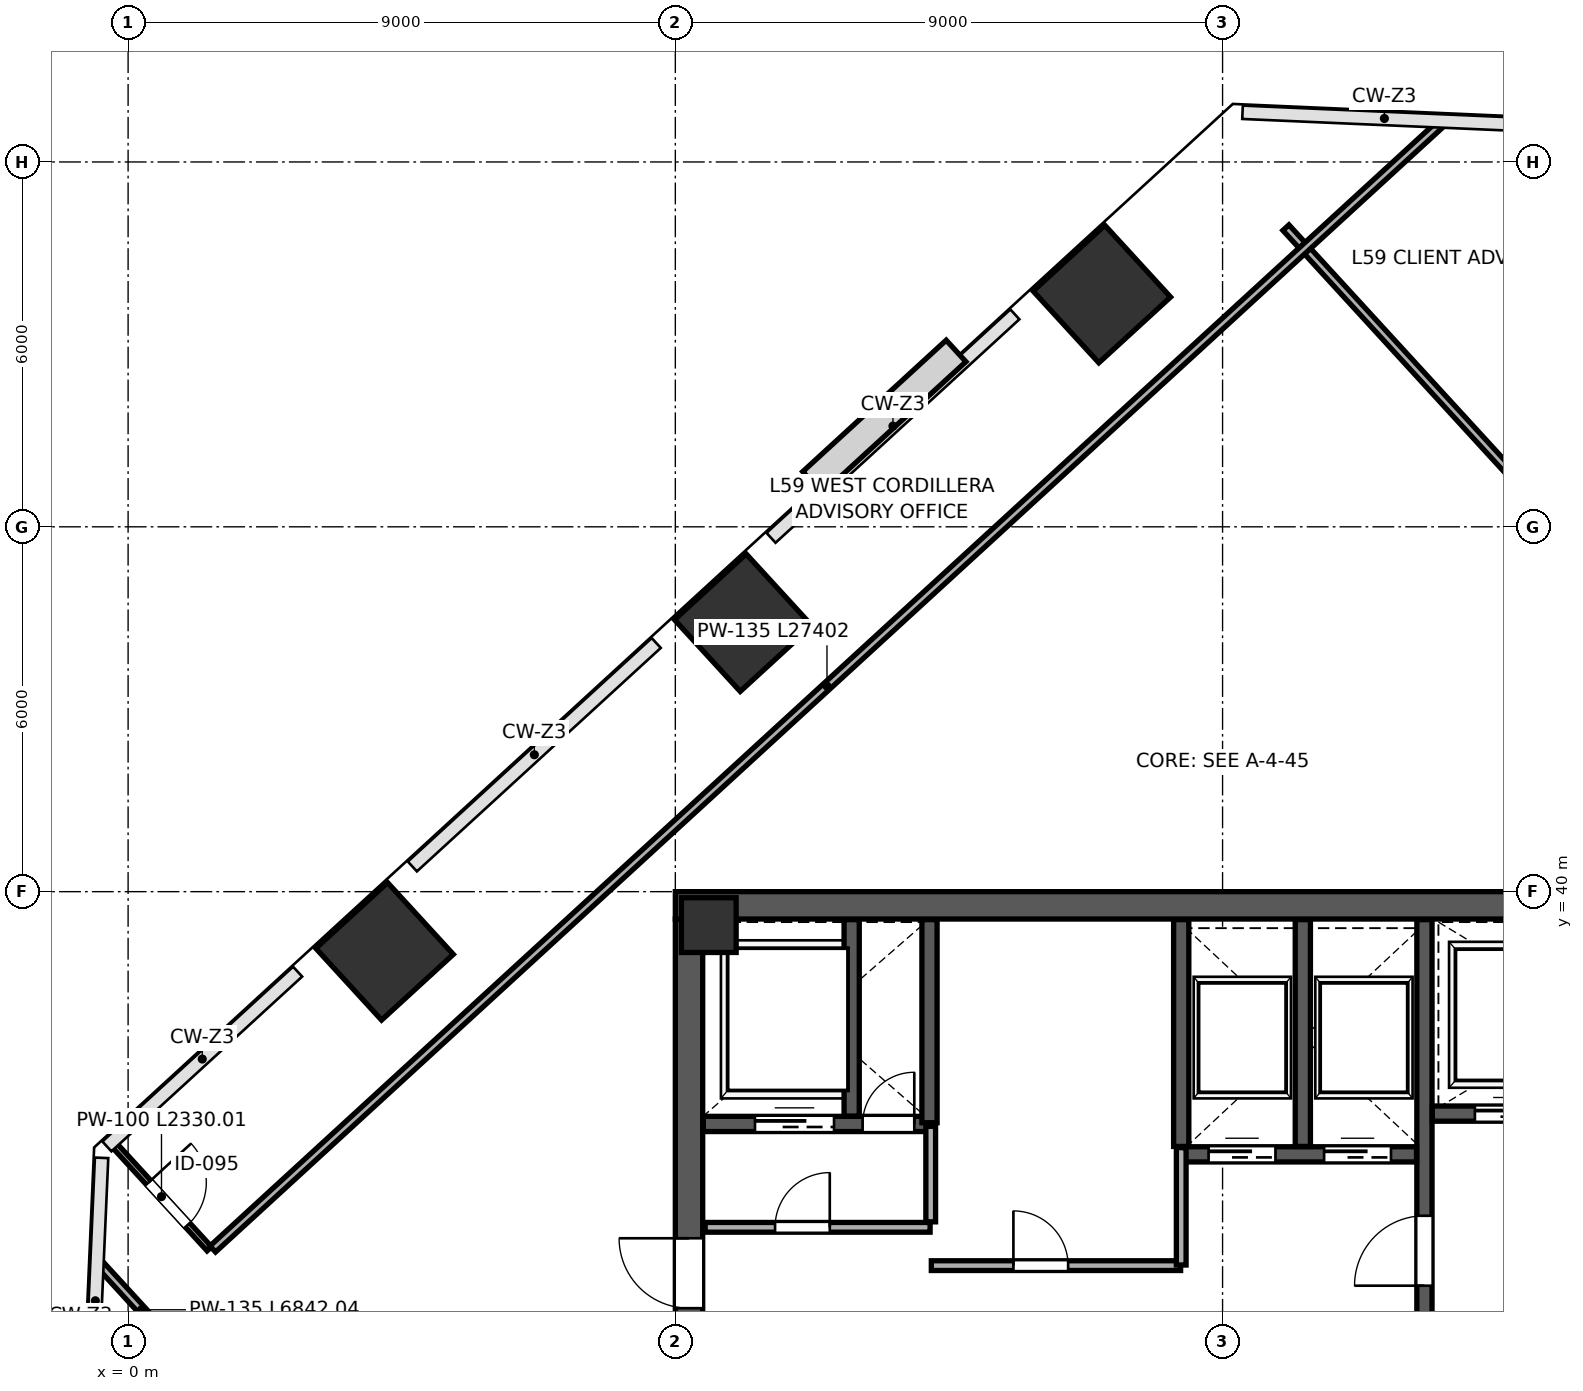
"""IFC4 building model, lengths in metres.
Left out: names, types, materials, properties, quantities, classifications, styles, units other than length and angle.
Written with IfcOpenShell. Run it as: python <this file> out.ifc"""

import sys

from ifc_helpers import new_model, si_unit, direction, frame, frame_2d, origin, origin_2d, place, context, subcontext, project, spatial, rectangle, extrude, source, transform, mapped, element, fill, save


model = new_model("IFC4")
c1 = context("Model", 3, precision=1e-05, world=origin(), true_north=direction((0.0, 1.0)))
c2 = subcontext(c1, "Body", "Model", "MODEL_VIEW")
j1 = project(units=[si_unit("LENGTHUNIT", "METRE"), si_unit("PLANEANGLEUNIT", "RADIAN")], contexts=[c1])
p1 = place(None, origin())
s1 = spatial("IfcSite", under=j1, at=p1, CompositionType="ELEMENT")
p2 = place(p1, origin())
s2 = spatial("IfcBuilding", under=s1, at=p2, CompositionType="ELEMENT")
p3 = place(p2, frame((0.0, 0.0, 262.6)))
s3 = spatial("IfcBuildingStorey", under=s2, at=p3, CompositionType="ELEMENT", Elevation=262.6)
m1 = source(origin(), c2, "Body", "SweptSolid", [
    extrude(rectangle(XDim=0.9, YDim=0.9, at=origin_2d()), origin(), (0.0, 0.0, 1.0), 4.198),
])
p4 = place(p3, frame((9.55, 39.45, 0.001), z_axis=(0.0, 0.0, 1.0), x_axis=(1.0, 0.0, 0.0)))
e1 = element("IfcColumn", 1, at=p4, inside=s3, PredefinedType="COLUMN", context=c2, shape_type="MappedRepresentation", body=[
    mapped(m1, transform((0.0, 0.0, 0.0), scale=1.0)),
])
m2 = source(origin(), c2, "Body", "SweptSolid", [
    extrude(rectangle(XDim=1.6, YDim=1.6, at=origin_2d()), origin(), (0.0, 0.0, 1.0), 4.198),
])
for number, where, z_axis, x_axis in (
    (2, (4.218, 39.018, 0.001), (0.0, 0.0, 1.0), (-0.676, 0.737, 0.0)),
    (3, (10.116, 44.423, 0.001), (0.0, 0.0, 1.0), (-0.676, 0.737, 0.0)),
    (4, (16.014, 49.828, 0.001), (0.0, 0.0, 1.0), (-0.676, 0.737, 0.0)),
):
    element("IfcColumn", number, at=place(p3, frame(where, z_axis=z_axis, x_axis=x_axis)), inside=s3, PredefinedType="COLUMN", context=c2, shape_type="MappedRepresentation", body=[
        mapped(m2, transform((0.0, 0.0, 0.0), scale=1.0)),
    ])
p5 = place(p3, frame((9.225, 24.45, 0.0), z_axis=(0.0, 0.0, 1.0), x_axis=(0.0, 1.0, 0.0)))
e5 = element("IfcWall", 5, at=p5, inside=s3, PredefinedType="SHEAR", context=c2, shape_type="SweptSolid", body=[
    extrude(rectangle(XDim=15.1, YDim=0.45, at=frame_2d((7.55, 0.0))), origin(), (0.0, 0.0, 1.0), 3.96),
])
p6 = place(p5, frame((8.7, 0.0, 0.0)))
e6 = element("IfcOpeningElement", 6, at=p6, cuts=e5, PredefinedType="OPENING", context=c2, shape_type="SweptSolid", body=[
    extrude(rectangle(XDim=1.15, YDim=2.2, at=frame_2d((0.575, 1.1))), frame((0.0, 0.235, 0.0), z_axis=(0.0, -1.0, 0.0), x_axis=(1.0, 0.0, 0.0)), (0.0, 0.0, 1.0), 0.47),
])
p7 = place(p3, frame((9.0, 39.775, 0.0), z_axis=(0.0, 0.0, 1.0), x_axis=(1.0, 0.0, 0.0)))
e7 = element("IfcWall", 7, at=p7, inside=s3, PredefinedType="SHEAR", context=c2, shape_type="SweptSolid", body=[
    extrude(rectangle(XDim=18.0, YDim=0.45, at=frame_2d((9.0, 0.0))), origin(), (0.0, 0.0, 1.0), 3.96),
])
p8 = place(p3, frame((21.32, 32.12, 0.0), z_axis=(0.0, 0.0, 1.0), x_axis=(0.0, 1.0, 0.0)))
e8 = element("IfcWall", 8, at=p8, inside=s3, PredefinedType="SHEAR", context=c2, shape_type="SweptSolid", body=[
    extrude(rectangle(XDim=7.42, YDim=0.25, at=frame_2d((3.71, 0.0))), origin(), (0.0, 0.0, 1.0), 3.96),
])
p9 = place(p8, frame((1.4, 0.0, 0.0)))
e9 = element("IfcOpeningElement", 9, at=p9, cuts=e8, PredefinedType="OPENING", context=c2, shape_type="SweptSolid", body=[
    extrude(rectangle(XDim=1.15, YDim=2.2, at=frame_2d((0.575, 1.1))), frame((0.0, 0.135, 0.0), z_axis=(0.0, -1.0, 0.0), x_axis=(1.0, 0.0, 0.0)), (0.0, 0.0, 1.0), 0.27),
])
p10 = place(p3, frame((9.46, 36.18, 0.0), z_axis=(0.0, 0.0, 1.0), x_axis=(1.0, 0.0, 0.0)))
e10 = element("IfcWall", 10, at=p10, inside=s3, PredefinedType="SHEAR", context=c2, shape_type="SweptSolid", body=[
    extrude(rectangle(XDim=3.79, YDim=0.25, at=frame_2d((1.895, 0.0))), origin(), (0.0, 0.0, 1.0), 3.96),
])
p11 = place(p10, frame((2.62, 0.0, 0.0)))
e11 = element("IfcOpeningElement", 11, at=p11, cuts=e10, PredefinedType="OPENING", context=c2, shape_type="SweptSolid", body=[
    extrude(rectangle(XDim=0.85, YDim=2.1, at=frame_2d((0.425, 1.05))), frame((0.0, 0.135, 0.0), z_axis=(0.0, -1.0, 0.0), x_axis=(1.0, 0.0, 0.0)), (0.0, 0.0, 1.0), 0.27),
])
p12 = place(p10, frame((0.85, 0.0, 0.0)))
e12 = element("IfcOpeningElement", 12, at=p12, cuts=e10, PredefinedType="OPENING", context=c2, shape_type="SweptSolid", body=[
    extrude(rectangle(XDim=1.3, YDim=2.25, at=frame_2d((0.65, 1.125))), frame((0.0, 0.135, 0.0), z_axis=(0.0, -1.0, 0.0), x_axis=(1.0, 0.0, 0.0)), (0.0, 0.0, 1.0), 0.27),
])
p13 = place(p3, frame((11.9, 36.31, 0.0), z_axis=(0.0, 0.0, 1.0), x_axis=(0.0, 1.0, 0.0)))
e13 = element("IfcWall", 13, at=p13, inside=s3, PredefinedType="SHEAR", context=c2, shape_type="SweptSolid", body=[
    extrude(rectangle(XDim=3.23, YDim=0.25, at=frame_2d((1.615, 0.0))), origin(), (0.0, 0.0, 1.0), 3.96),
])
p14 = place(p3, frame((21.45, 36.35, 0.0), z_axis=(0.0, 0.0, 1.0), x_axis=(1.0, 0.0, 0.0)))
e14 = element("IfcWall", 14, at=p14, inside=s3, PredefinedType="SHEAR", context=c2, shape_type="SweptSolid", body=[
    extrude(rectangle(XDim=5.09, YDim=0.25, at=frame_2d((2.545, 0.0))), origin(), (0.0, 0.0, 1.0), 3.96),
])
p15 = place(p14, frame((0.7, 0.0, 0.0)))
e15 = element("IfcOpeningElement", 15, at=p15, cuts=e14, PredefinedType="OPENING", context=c2, shape_type="SweptSolid", body=[
    extrude(rectangle(XDim=1.2, YDim=2.2, at=frame_2d((0.6, 1.1))), frame((0.0, 0.135, 0.0), z_axis=(0.0, -1.0, 0.0), x_axis=(1.0, 0.0, 0.0)), (0.0, 0.0, 1.0), 0.27),
])
p16 = place(p14, frame((3.25, 0.0, 0.0)))
e16 = element("IfcOpeningElement", 16, at=p16, cuts=e14, PredefinedType="OPENING", context=c2, shape_type="SweptSolid", body=[
    extrude(rectangle(XDim=1.2, YDim=2.2, at=frame_2d((0.6, 1.1))), frame((0.0, 0.135, 0.0), z_axis=(0.0, -1.0, 0.0), x_axis=(1.0, 0.0, 0.0)), (0.0, 0.0, 1.0), 0.27),
])
p17 = place(p3, frame((13.18, 36.2, 0.0), z_axis=(0.0, 0.0, 1.0), x_axis=(0.0, 1.0, 0.0)))
e17 = element("IfcWall", 17, at=p17, inside=s3, PredefinedType="SHEAR", context=c2, shape_type="SweptSolid", body=[
    extrude(rectangle(XDim=3.34, YDim=0.25, at=frame_2d((1.67, 0.0))), origin(), (0.0, 0.0, 1.0), 3.96),
])
p18 = place(p3, frame((17.32, 35.68, 0.0), z_axis=(0.0, 0.0, 1.0), x_axis=(1.0, 0.0, 0.0)))
e18 = element("IfcWall", 18, at=p18, inside=s3, PredefinedType="SHEAR", context=c2, shape_type="SweptSolid", body=[
    extrude(rectangle(XDim=3.87, YDim=0.25, at=frame_2d((1.935, 0.0))), origin(), (0.0, 0.0, 1.0), 3.96),
])
p19 = place(p18, frame((0.45, 0.0, 0.0)))
e19 = element("IfcOpeningElement", 19, at=p19, cuts=e18, PredefinedType="OPENING", context=c2, shape_type="SweptSolid", body=[
    extrude(rectangle(XDim=1.1, YDim=2.2, at=frame_2d((0.55, 1.1))), frame((0.0, 0.135, 0.0), z_axis=(0.0, -1.0, 0.0), x_axis=(1.0, 0.0, 0.0)), (0.0, 0.0, 1.0), 0.27),
])
p20 = place(p18, frame((2.35, 0.0, 0.0)))
e20 = element("IfcOpeningElement", 20, at=p20, cuts=e18, PredefinedType="OPENING", context=c2, shape_type="SweptSolid", body=[
    extrude(rectangle(XDim=1.1, YDim=2.2, at=frame_2d((0.55, 1.1))), frame((0.0, 0.135, 0.0), z_axis=(0.0, -1.0, 0.0), x_axis=(1.0, 0.0, 0.0)), (0.0, 0.0, 1.0), 0.27),
])
for number, where, z_axis, x_axis in (
    (21, (17.32, 35.81, 0.0), (0.0, 0.0, 1.0), (0.0, 1.0, 0.0)),
    (22, (19.32, 35.81, 0.0), (0.0, 0.0, 1.0), (0.0, 1.0, 0.0)),
):
    element("IfcWall", number, at=place(p3, frame(where, z_axis=z_axis, x_axis=x_axis)), inside=s3, PredefinedType="SHEAR", context=c2, shape_type="SweptSolid", body=[
        extrude(rectangle(XDim=3.73, YDim=0.25, at=frame_2d((1.865, 0.0))), origin(), (0.0, 0.0, 1.0), 3.96),
    ])
p21 = place(p3, frame((9.49, 34.48, 0.0), z_axis=(0.0, 0.0, 1.0), x_axis=(1.0, 0.0, 0.0)))
e23 = element("IfcWall", 23, at=p21, inside=s3, PredefinedType="PARTITIONING", context=c2, shape_type="SweptSolid", body=[
    extrude(rectangle(XDim=3.7, YDim=0.16, at=frame_2d((1.85, 0.0))), origin(), (0.0, 0.0, 1.0), 3.96),
])
p22 = place(p21, frame((1.15, 0.0, 0.0)))
e24 = element("IfcOpeningElement", 24, at=p22, cuts=e23, PredefinedType="OPENING", context=c2, shape_type="SweptSolid", body=[
    extrude(rectangle(XDim=0.9, YDim=2.15, at=frame_2d((0.45, 1.075))), frame((0.0, 0.09, 0.0), z_axis=(0.0, -1.0, 0.0), x_axis=(1.0, 0.0, 0.0)), (0.0, 0.0, 1.0), 0.18),
])
p23 = place(p3, frame((13.2, 34.57, 0.0), z_axis=(0.0, 0.0, 1.0), x_axis=(0.0, 1.0, 0.0)))
e25 = element("IfcWall", 25, at=p23, inside=s3, PredefinedType="PARTITIONING", context=c2, shape_type="SweptSolid", body=[
    extrude(rectangle(XDim=1.57, YDim=0.16, at=frame_2d((0.785, 0.0))), origin(), (0.0, 0.0, 1.0), 3.96),
])
p24 = place(p3, frame((13.21, 33.85, 0.0), z_axis=(0.0, 0.0, 1.0), x_axis=(1.0, 0.0, 0.0)))
e26 = element("IfcWall", 26, at=p24, inside=s3, PredefinedType="PARTITIONING", context=c2, shape_type="SweptSolid", body=[
    extrude(rectangle(XDim=4.1, YDim=0.16, at=frame_2d((2.05, 0.0))), origin(), (0.0, 0.0, 1.0), 3.96),
])
p25 = place(p24, frame((1.35, 0.0, 0.0)))
e27 = element("IfcOpeningElement", 27, at=p25, cuts=e26, PredefinedType="OPENING", context=c2, shape_type="SweptSolid", body=[
    extrude(rectangle(XDim=0.9, YDim=2.15, at=frame_2d((0.45, 1.075))), frame((0.0, 0.09, 0.0), z_axis=(0.0, -1.0, 0.0), x_axis=(1.0, 0.0, 0.0)), (0.0, 0.0, 1.0), 0.18),
])
p26 = place(p3, frame((17.32, 33.86, 0.0), z_axis=(0.0, 0.0, 1.0), x_axis=(0.0, 1.0, 0.0)))
e28 = element("IfcWall", 28, at=p26, inside=s3, PredefinedType="PARTITIONING", context=c2, shape_type="SweptSolid", body=[
    extrude(rectangle(XDim=1.93, YDim=0.16, at=frame_2d((0.965, 0.0))), origin(), (0.0, 0.0, 1.0), 3.96),
])
p27 = place(p3, frame((-0.474, 33.881, 0.0), z_axis=(0.0, 0.0, 1.0), x_axis=(0.675605050901, -0.73726373517, 0.0)))
e29 = element("IfcWall", 29, at=p27, inside=s3, PredefinedType="PARTITIONING", context=c2, shape_type="SweptSolid", body=[
    extrude(rectangle(XDim=6.842, YDim=0.135, at=frame_2d((3.421, 0.0))), origin(), (0.0, 0.0, 1.0), 3.96),
])
p28 = place(p27, frame((2.32, 0.0, 0.0)))
e30 = element("IfcOpeningElement", 30, at=p28, cuts=e29, PredefinedType="OPENING", context=c2, shape_type="SweptSolid", body=[
    extrude(rectangle(XDim=0.9, YDim=2.15, at=frame_2d((0.45, 1.075))), frame((0.0, 0.078, 0.0), z_axis=(0.0, -1.0, 0.0), x_axis=(1.0, 0.0, 0.0)), (0.0, 0.0, 1.0), 0.155),
])
p29 = place(p27, frame((4.42, 0.0, 0.0)))
e31 = element("IfcOpeningElement", 31, at=p29, cuts=e29, PredefinedType="OPENING", context=c2, shape_type="SweptSolid", body=[
    extrude(rectangle(XDim=0.95, YDim=2.15, at=frame_2d((0.475, 1.075))), frame((0.0, 0.078, 0.0), z_axis=(0.0, -1.0, 0.0), x_axis=(1.0, 0.0, 0.0)), (0.0, 0.0, 1.0), 0.155),
])
p30 = place(p3, frame((19.042, 50.92, 0.0), z_axis=(0.0, 0.0, 1.0), x_axis=(0.675589646996, -0.737277850523, 0.0)))
e32 = element("IfcWall", 32, at=p30, inside=s3, PredefinedType="PARTITIONING", context=c2, shape_type="SweptSolid", body=[
    extrude(rectangle(XDim=21.87, YDim=0.135, at=frame_2d((10.935, 0.0))), origin(), (0.0, 0.0, 1.0), 3.96),
])
p31 = place(p30, frame((5.4, 0.0, 0.0)))
e33 = element("IfcOpeningElement", 33, at=p31, cuts=e32, PredefinedType="OPENING", context=c2, shape_type="SweptSolid", body=[
    extrude(rectangle(XDim=0.95, YDim=2.15, at=frame_2d((0.475, 1.075))), frame((0.0, 0.078, 0.0), z_axis=(0.0, -1.0, 0.0), x_axis=(1.0, 0.0, 0.0)), (0.0, 0.0, 1.0), 0.155),
])
p32 = place(p30, frame((9.4, 0.0, 0.0)))
e34 = element("IfcOpeningElement", 34, at=p32, cuts=e32, PredefinedType="OPENING", context=c2, shape_type="SweptSolid", body=[
    extrude(rectangle(XDim=0.95, YDim=2.15, at=frame_2d((0.475, 1.075))), frame((0.0, 0.078, 0.0), z_axis=(0.0, -1.0, 0.0), x_axis=(1.0, 0.0, 0.0)), (0.0, 0.0, 1.0), 0.155),
])
p33 = place(p3, frame((-0.238, 35.844, 0.0), z_axis=(0.0, 0.0, 1.0), x_axis=(0.67562972666, -0.737241122329, 0.0)))
e35 = element("IfcWall", 35, at=p33, inside=s3, PredefinedType="PARTITIONING", context=c2, shape_type="SweptSolid", body=[
    extrude(rectangle(XDim=2.33, YDim=0.1, at=frame_2d((1.165, 0.0))), origin(), (0.0, 0.0, 1.0), 3.96),
])
p34 = place(p33, frame((0.85, 0.0, 0.0)))
e36 = element("IfcOpeningElement", 36, at=p34, cuts=e35, PredefinedType="OPENING", context=c2, shape_type="SweptSolid", body=[
    extrude(rectangle(XDim=0.95, YDim=2.15, at=frame_2d((0.475, 1.075))), frame((0.0, 0.06, 0.0), z_axis=(0.0, -1.0, 0.0), x_axis=(1.0, 0.0, 0.0)), (0.0, 0.0, 1.0), 0.12),
])
p35 = place(p3, frame((1.393, 34.124, 0.0), z_axis=(0.0, 0.0, 1.0), x_axis=(0.737274323436, 0.675593496121, 0.0)))
e37 = element("IfcWall", 37, at=p35, inside=s3, PredefinedType="PARTITIONING", context=c2, shape_type="SweptSolid", body=[
    extrude(rectangle(XDim=27.402, YDim=0.135, at=frame_2d((13.701, 0.0))), origin(), (0.0, 0.0, 1.0), 3.96),
])
m3 = source(origin(), c2, "Body", "SweptSolid", [
    extrude(rectangle(XDim=1.15, YDim=2.2, at=frame_2d((0.575, 1.1))), frame((0.0, 0.025, 0.0), z_axis=(0.0, -1.0, 0.0), x_axis=(1.0, 0.0, 0.0)), (0.0, 0.0, 1.0), 0.05),
])
p36 = place(p9, origin())
e38 = element("IfcDoor", 38, at=p36, inside=s3, OperationType="SINGLE_SWING_LEFT", PredefinedType="DOOR", context=c2, shape_type="MappedRepresentation", body=[
    mapped(m3, transform((0.0, 0.0, 0.0), scale=1.0)),
])
fill(e9, e38)
p37 = place(p6, origin())
e39 = element("IfcDoor", 39, at=p37, inside=s3, OperationType="SINGLE_SWING_RIGHT", PredefinedType="DOOR", context=c2, shape_type="MappedRepresentation", body=[
    mapped(m3, transform((0.0, 0.0, 0.0), scale=1.0)),
])
fill(e6, e39)
m4 = source(origin(), c2, "Body", "SweptSolid", [
    extrude(rectangle(XDim=0.85, YDim=2.1, at=frame_2d((0.425, 1.05))), frame((0.0, 0.025, 0.0), z_axis=(0.0, -1.0, 0.0), x_axis=(1.0, 0.0, 0.0)), (0.0, 0.0, 1.0), 0.05),
])
p38 = place(p11, origin())
e40 = element("IfcDoor", 40, at=p38, inside=s3, OperationType="SINGLE_SWING_RIGHT", PredefinedType="DOOR", context=c2, shape_type="MappedRepresentation", body=[
    mapped(m4, transform((0.0, 0.0, 0.0), scale=1.0)),
])
fill(e11, e40)
m5 = source(origin(), c2, "Body", "SweptSolid", [
    extrude(rectangle(XDim=1.1, YDim=2.2, at=frame_2d((0.55, 1.1))), frame((0.0, 0.025, 0.0), z_axis=(0.0, -1.0, 0.0), x_axis=(1.0, 0.0, 0.0)), (0.0, 0.0, 1.0), 0.05),
])
p39 = place(p19, origin())
e41 = element("IfcDoor", 41, at=p39, inside=s3, OperationType="SLIDING_TO_LEFT", PredefinedType="DOOR", context=c2, shape_type="MappedRepresentation", body=[
    mapped(m5, transform((0.0, 0.0, 0.0), scale=1.0)),
])
fill(e19, e41)
p40 = place(p20, origin())
e42 = element("IfcDoor", 42, at=p40, inside=s3, OperationType="SLIDING_TO_RIGHT", PredefinedType="DOOR", context=c2, shape_type="MappedRepresentation", body=[
    mapped(m5, transform((0.0, 0.0, 0.0), scale=1.0)),
])
fill(e20, e42)
m6 = source(origin(), c2, "Body", "SweptSolid", [
    extrude(rectangle(XDim=1.2, YDim=2.2, at=frame_2d((0.6, 1.1))), frame((0.0, 0.025, 0.0), z_axis=(0.0, -1.0, 0.0), x_axis=(1.0, 0.0, 0.0)), (0.0, 0.0, 1.0), 0.05),
])
p41 = place(p15, origin())
e43 = element("IfcDoor", 43, at=p41, inside=s3, OperationType="SLIDING_TO_LEFT", PredefinedType="DOOR", context=c2, shape_type="MappedRepresentation", body=[
    mapped(m6, transform((0.0, 0.0, 0.0), scale=1.0)),
])
fill(e15, e43)
m7 = source(origin(), c2, "Body", "SweptSolid", [
    extrude(rectangle(XDim=1.3, YDim=2.25, at=frame_2d((0.65, 1.125))), frame((0.0, 0.025, 0.0), z_axis=(0.0, -1.0, 0.0), x_axis=(1.0, 0.0, 0.0)), (0.0, 0.0, 1.0), 0.05),
])
p42 = place(p12, origin())
e44 = element("IfcDoor", 44, at=p42, inside=s3, OperationType="SLIDING_TO_LEFT", PredefinedType="DOOR", context=c2, shape_type="MappedRepresentation", body=[
    mapped(m7, transform((0.0, 0.0, 0.0), scale=1.0)),
])
fill(e12, e44)
m8 = source(origin(), c2, "Body", "SweptSolid", [
    extrude(rectangle(XDim=0.9, YDim=2.15, at=frame_2d((0.45, 1.075))), frame((0.0, 0.025, 0.0), z_axis=(0.0, -1.0, 0.0), x_axis=(1.0, 0.0, 0.0)), (0.0, 0.0, 1.0), 0.05),
])
p43 = place(p22, origin())
e45 = element("IfcDoor", 45, at=p43, inside=s3, OperationType="SINGLE_SWING_RIGHT", PredefinedType="DOOR", context=c2, shape_type="MappedRepresentation", body=[
    mapped(m8, transform((0.0, 0.0, 0.0), scale=1.0)),
])
fill(e24, e45)
p44 = place(p25, origin())
e46 = element("IfcDoor", 46, at=p44, inside=s3, OperationType="SINGLE_SWING_LEFT", PredefinedType="DOOR", context=c2, shape_type="MappedRepresentation", body=[
    mapped(m8, transform((0.0, 0.0, 0.0), scale=1.0)),
])
fill(e27, e46)
m9 = source(origin(), c2, "Body", "SweptSolid", [
    extrude(rectangle(XDim=0.95, YDim=2.15, at=frame_2d((0.475, 1.075))), frame((0.0, 0.025, 0.0), z_axis=(0.0, -1.0, 0.0), x_axis=(1.0, 0.0, 0.0)), (0.0, 0.0, 1.0), 0.05),
])
p45 = place(p34, origin())
e47 = element("IfcDoor", 47, at=p45, inside=s3, OperationType="SINGLE_SWING_LEFT", PredefinedType="DOOR", context=c2, shape_type="MappedRepresentation", body=[
    mapped(m9, transform((0.0, 0.0, 0.0), scale=1.0)),
])
fill(e36, e47)
save(model, sys.argv[1])
